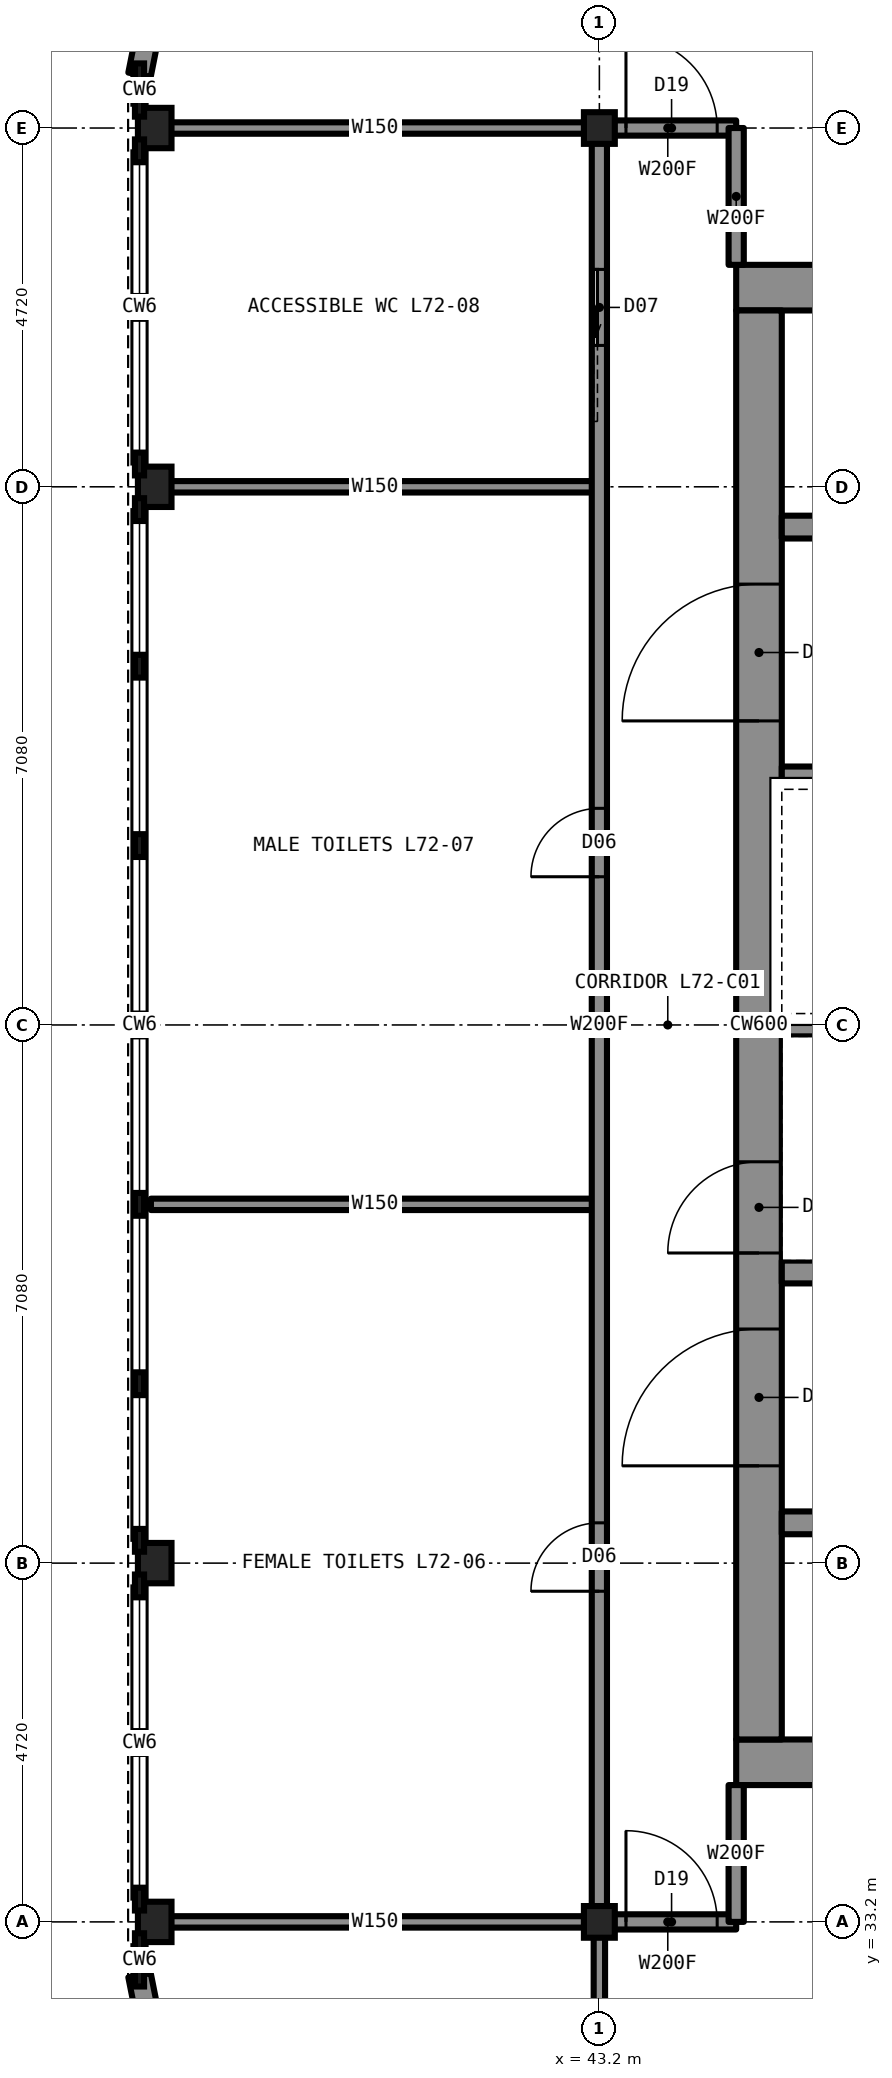
"""IFC4 building model, lengths in metres.
Left out: names, types, materials, properties, quantities, classifications, styles, units other than length and angle.
Written with IfcOpenShell. Run it as: python <this file> out.ifc"""

import sys

from ifc_helpers import new_model, si_unit, direction, frame, frame_2d, origin, origin_2d, place, context, subcontext, project, spatial, rectangle, i_section, extrude, element, fill, save


model = new_model("IFC4")
c1 = context("Model", 3, precision=1e-05, world=origin(), true_north=direction((0.0, 1.0)))
c2 = subcontext(c1, "Body", "Model", "MODEL_VIEW")
j1 = project(units=[si_unit("LENGTHUNIT", "METRE"), si_unit("PLANEANGLEUNIT", "RADIAN")], contexts=[c1])
p1 = place(None, origin())
s1 = spatial("IfcSite", under=j1, at=p1, CompositionType="ELEMENT")
p2 = place(p1, origin())
s2 = spatial("IfcBuilding", under=s1, at=p2, CompositionType="ELEMENT")
p3 = place(p2, frame((0.0, 0.0, 266.7)))
s3 = spatial("IfcBuildingStorey", under=s2, at=p3, CompositionType="ELEMENT", Elevation=266.7)
for number, where, z_axis, x_axis in (
    (1, (37.35, 33.2, 0.0), (0.0, 0.0, 1.0), (1.0, 0.0, 0.0)),
    (2, (37.35, 37.92, 0.0), (0.0, 0.0, 1.0), (1.0, 0.0, 0.0)),
    (3, (37.35, 52.08, 0.0), (0.0, 0.0, 1.0), (1.0, 0.0, 0.0)),
    (4, (37.35, 56.8, 0.0), (0.0, 0.0, 1.0), (1.0, 0.0, 0.0)),
):
    element("IfcColumn", number, at=place(p3, frame(where, z_axis=z_axis, x_axis=x_axis)), inside=s3, PredefinedType="COLUMN", context=c2, shape_type="SweptSolid", body=[
        extrude(i_section(OverallWidth=0.442, OverallDepth=0.531, WebThickness=0.066, FlangeThickness=0.106, at=origin_2d()), origin(), (0.0, 0.0, 1.0), 5.5),
    ])
for number, where, z_axis, x_axis in (
    (5, (43.2, 33.2, 0.0), (0.0, 0.0, 1.0), (1.0, 0.0, 0.0)),
    (6, (43.2, 56.8, 0.0), (0.0, 0.0, 1.0), (1.0, 0.0, 0.0)),
):
    element("IfcColumn", number, at=place(p3, frame(where, z_axis=z_axis, x_axis=x_axis)), inside=s3, PredefinedType="COLUMN", context=c2, shape_type="SweptSolid", body=[
        extrude(i_section(OverallWidth=0.406, OverallDepth=0.417, WebThickness=0.03, FlangeThickness=0.048, at=origin_2d()), origin(), (0.0, 0.0, 1.0), 5.5),
    ])
for number, where, z_axis, x_axis in (
    (7, (45.0, 54.7, 0.0), (0.0, 0.0, 1.0), (1.0, 0.0, 0.0)),
    (8, (45.0, 35.3, 0.0), (0.0, 0.0, 1.0), (1.0, 0.0, 0.0)),
):
    element("IfcWall", number, at=place(p3, frame(where, z_axis=z_axis, x_axis=x_axis)), inside=s3, PredefinedType="SHEAR", context=c2, shape_type="SweptSolid", body=[
        extrude(rectangle(XDim=20.0, YDim=0.6, at=frame_2d((10.0, 0.0))), origin(), (0.0, 0.0, 1.0), 5.5),
    ])
p4 = place(p3, frame((45.3, 35.6, 0.0), z_axis=(0.0, 0.0, 1.0), x_axis=(0.0, 1.0, 0.0)))
e9 = element("IfcWall", 9, at=p4, inside=s3, PredefinedType="SHEAR", context=c2, shape_type="SweptSolid", body=[
    extrude(rectangle(XDim=18.8, YDim=0.6, at=frame_2d((9.4, 0.0))), origin(), (0.0, 0.0, 1.0), 5.5),
])
p5 = place(p4, frame((13.4, 0.0, 0.0)))
e10 = element("IfcOpeningElement", 10, at=p5, cuts=e9, PredefinedType="OPENING", context=c2, shape_type="SweptSolid", body=[
    extrude(rectangle(XDim=1.8, YDim=2.2, at=frame_2d((0.9, 1.1))), frame((0.0, 0.31, 0.0), z_axis=(0.0, -1.0, 0.0), x_axis=(1.0, 0.0, 0.0)), (0.0, 0.0, 1.0), 0.62),
])
p6 = place(p4, frame((3.6, 0.0, 0.0)))
e11 = element("IfcOpeningElement", 11, at=p6, cuts=e9, PredefinedType="OPENING", context=c2, shape_type="SweptSolid", body=[
    extrude(rectangle(XDim=1.8, YDim=2.2, at=frame_2d((0.9, 1.1))), frame((0.0, 0.31, 0.0), z_axis=(0.0, -1.0, 0.0), x_axis=(1.0, 0.0, 0.0)), (0.0, 0.0, 1.0), 0.62),
])
p7 = place(p4, frame((6.4, 0.0, 0.0)))
e12 = element("IfcOpeningElement", 12, at=p7, cuts=e9, PredefinedType="OPENING", context=c2, shape_type="SweptSolid", body=[
    extrude(rectangle(XDim=1.2, YDim=2.2, at=frame_2d((0.6, 1.1))), frame((0.0, 0.31, 0.0), z_axis=(0.0, -1.0, 0.0), x_axis=(1.0, 0.0, 0.0)), (0.0, 0.0, 1.0), 0.62),
])
p8 = place(p3, frame((45.6, 51.55, 0.0), z_axis=(0.0, 0.0, 1.0), x_axis=(1.0, 0.0, 0.0)))
e13 = element("IfcWall", 13, at=p8, inside=s3, PredefinedType="SHEAR", context=c2, shape_type="SweptSolid", body=[
    extrude(rectangle(XDim=18.8, YDim=0.3, at=frame_2d((9.4, 0.0))), origin(), (0.0, 0.0, 1.0), 5.5),
])
p9 = place(p8, frame((4.8, 0.0, 0.0)))
e14 = element("IfcOpeningElement", 14, at=p9, cuts=e13, PredefinedType="OPENING", context=c2, shape_type="SweptSolid", body=[
    extrude(rectangle(XDim=1.0, YDim=2.1, at=frame_2d((0.5, 1.05))), frame((0.0, 0.16, 0.0), z_axis=(0.0, -1.0, 0.0), x_axis=(1.0, 0.0, 0.0)), (0.0, 0.0, 1.0), 0.32),
])
p10 = place(p8, frame((11.6, 0.0, 0.0)))
e15 = element("IfcOpeningElement", 15, at=p10, cuts=e13, PredefinedType="OPENING", context=c2, shape_type="SweptSolid", body=[
    extrude(rectangle(XDim=1.1, YDim=2.2, at=frame_2d((0.55, 1.1))), frame((0.0, 0.16, 0.0), z_axis=(0.0, -1.0, 0.0), x_axis=(1.0, 0.0, 0.0)), (0.0, 0.0, 1.0), 0.32),
])
p11 = place(p8, frame((14.3, 0.0, 0.0)))
e16 = element("IfcOpeningElement", 16, at=p11, cuts=e13, PredefinedType="OPENING", context=c2, shape_type="SweptSolid", body=[
    extrude(rectangle(XDim=1.1, YDim=2.2, at=frame_2d((0.55, 1.1))), frame((0.0, 0.16, 0.0), z_axis=(0.0, -1.0, 0.0), x_axis=(1.0, 0.0, 0.0)), (0.0, 0.0, 1.0), 0.32),
])
p12 = place(p3, frame((45.6, 38.45, 0.0), z_axis=(0.0, 0.0, 1.0), x_axis=(1.0, 0.0, 0.0)))
e17 = element("IfcWall", 17, at=p12, inside=s3, PredefinedType="SHEAR", context=c2, shape_type="SweptSolid", body=[
    extrude(rectangle(XDim=18.8, YDim=0.3, at=frame_2d((9.4, 0.0))), origin(), (0.0, 0.0, 1.0), 5.5),
])
p13 = place(p12, frame((4.8, 0.0, 0.0)))
e18 = element("IfcOpeningElement", 18, at=p13, cuts=e17, PredefinedType="OPENING", context=c2, shape_type="SweptSolid", body=[
    extrude(rectangle(XDim=1.0, YDim=2.1, at=frame_2d((0.5, 1.05))), frame((0.0, 0.16, 0.0), z_axis=(0.0, -1.0, 0.0), x_axis=(1.0, 0.0, 0.0)), (0.0, 0.0, 1.0), 0.32),
])
p14 = place(p12, frame((11.5, 0.0, 0.0)))
e19 = element("IfcOpeningElement", 19, at=p14, cuts=e17, PredefinedType="OPENING", context=c2, shape_type="SweptSolid", body=[
    extrude(rectangle(XDim=1.1, YDim=2.2, at=frame_2d((0.55, 1.1))), frame((0.0, 0.16, 0.0), z_axis=(0.0, -1.0, 0.0), x_axis=(1.0, 0.0, 0.0)), (0.0, 0.0, 1.0), 0.32),
])
p15 = place(p12, frame((14.2, 0.0, 0.0)))
e20 = element("IfcOpeningElement", 20, at=p15, cuts=e17, PredefinedType="OPENING", context=c2, shape_type="SweptSolid", body=[
    extrude(rectangle(XDim=1.1, YDim=2.2, at=frame_2d((0.55, 1.1))), frame((0.0, 0.16, 0.0), z_axis=(0.0, -1.0, 0.0), x_axis=(1.0, 0.0, 0.0)), (0.0, 0.0, 1.0), 0.32),
])
p16 = place(p12, frame((16.9, 0.0, 0.0)))
e21 = element("IfcOpeningElement", 21, at=p16, cuts=e17, PredefinedType="OPENING", context=c2, shape_type="SweptSolid", body=[
    extrude(rectangle(XDim=1.1, YDim=2.2, at=frame_2d((0.55, 1.1))), frame((0.0, 0.16, 0.0), z_axis=(0.0, -1.0, 0.0), x_axis=(1.0, 0.0, 0.0)), (0.0, 0.0, 1.0), 0.32),
])
for number, where, z_axis, x_axis in (
    (22, (45.6, 48.25, 0.0), (0.0, 0.0, 1.0), (1.0, 0.0, 0.0)),
    (23, (45.6, 41.75, 0.0), (0.0, 0.0, 1.0), (1.0, 0.0, 0.0)),
):
    element("IfcWall", number, at=place(p3, frame(where, z_axis=z_axis, x_axis=x_axis)), inside=s3, PredefinedType="SHEAR", context=c2, shape_type="SweptSolid", body=[
        extrude(rectangle(XDim=7.1, YDim=0.3, at=frame_2d((3.55, 0.0))), origin(), (0.0, 0.0, 1.0), 5.5),
    ])
p17 = place(p3, frame((45.6, 45.0, 0.0), z_axis=(0.0, 0.0, 1.0), x_axis=(1.0, 0.0, 0.0)))
e24 = element("IfcWall", 24, at=p17, inside=s3, PredefinedType="SHEAR", context=c2, shape_type="SweptSolid", body=[
    extrude(rectangle(XDim=6.8, YDim=0.3, at=frame_2d((3.4, 0.0))), origin(), (0.0, 0.0, 1.0), 5.5),
])
p18 = place(p3, frame((43.2, 33.2, 0.0), z_axis=(0.0, 0.0, 1.0), x_axis=(1.0, 0.0, 0.0)))
e25 = element("IfcWall", 25, at=p18, inside=s3, PredefinedType="PARTITIONING", context=c2, shape_type="SweptSolid", body=[
    extrude(rectangle(XDim=1.8, YDim=0.2, at=frame_2d((0.9, 0.0))), origin(), (0.0, 0.0, 1.0), 5.28),
])
p19 = place(p18, frame((0.35, 0.0, 0.0)))
e26 = element("IfcOpeningElement", 26, at=p19, cuts=e25, PredefinedType="OPENING", context=c2, shape_type="SweptSolid", body=[
    extrude(rectangle(XDim=1.2, YDim=2.2, at=frame_2d((0.6, 1.1))), frame((0.0, 0.11, 0.0), z_axis=(0.0, -1.0, 0.0), x_axis=(1.0, 0.0, 0.0)), (0.0, 0.0, 1.0), 0.22),
])
for number, where, z_axis, x_axis in (
    (27, (37.3, 33.2, 0.0), (0.0, 0.0, 1.0), (1.0, 0.0, 0.0)),
    (28, (37.3, 42.64, 0.0), (0.0, 0.0, 1.0), (1.0, 0.0, 0.0)),
):
    element("IfcWall", number, at=place(p3, frame(where, z_axis=z_axis, x_axis=x_axis)), inside=s3, PredefinedType="PARTITIONING", context=c2, shape_type="SweptSolid", body=[
        extrude(rectangle(XDim=5.9, YDim=0.15, at=frame_2d((2.95, 0.0))), origin(), (0.0, 0.0, 1.0), 4.368),
    ])
p20 = place(p3, frame((43.2, 56.8, 0.0), z_axis=(0.0, 0.0, 1.0), x_axis=(1.0, 0.0, 0.0)))
e29 = element("IfcWall", 29, at=p20, inside=s3, PredefinedType="PARTITIONING", context=c2, shape_type="SweptSolid", body=[
    extrude(rectangle(XDim=1.8, YDim=0.2, at=frame_2d((0.9, 0.0))), origin(), (0.0, 0.0, 1.0), 5.28),
])
p21 = place(p20, frame((0.35, 0.0, 0.0)))
e30 = element("IfcOpeningElement", 30, at=p21, cuts=e29, PredefinedType="OPENING", context=c2, shape_type="SweptSolid", body=[
    extrude(rectangle(XDim=1.2, YDim=2.2, at=frame_2d((0.6, 1.1))), frame((0.0, 0.11, 0.0), z_axis=(0.0, -1.0, 0.0), x_axis=(1.0, 0.0, 0.0)), (0.0, 0.0, 1.0), 0.22),
])
for number, where, z_axis, x_axis in (
    (31, (37.3, 56.8, 0.0), (0.0, 0.0, 1.0), (1.0, 0.0, 0.0)),
    (32, (37.3, 52.08, 0.0), (0.0, 0.0, 1.0), (1.0, 0.0, 0.0)),
):
    element("IfcWall", number, at=place(p3, frame(where, z_axis=z_axis, x_axis=x_axis)), inside=s3, PredefinedType="PARTITIONING", context=c2, shape_type="SweptSolid", body=[
        extrude(rectangle(XDim=5.9, YDim=0.15, at=frame_2d((2.95, 0.0))), origin(), (0.0, 0.0, 1.0), 4.368),
    ])
for number, where, z_axis, x_axis in (
    (33, (45.0, 33.2, 0.0), (0.0, 0.0, 1.0), (0.0, 1.0, 0.0)),
    (34, (45.0, 55.0, 0.0), (0.0, 0.0, 1.0), (0.0, 1.0, 0.0)),
):
    element("IfcWall", number, at=place(p3, frame(where, z_axis=z_axis, x_axis=x_axis)), inside=s3, PredefinedType="PARTITIONING", context=c2, shape_type="SweptSolid", body=[
        extrude(rectangle(XDim=1.8, YDim=0.2, at=frame_2d((0.9, 0.0))), origin(), (0.0, 0.0, 1.0), 5.28),
    ])
p22 = place(p3, frame((43.2, 33.2, 0.0), z_axis=(0.0, 0.0, 1.0), x_axis=(0.0, 1.0, 0.0)))
e35 = element("IfcWall", 35, at=p22, inside=s3, PredefinedType="PARTITIONING", context=c2, shape_type="SweptSolid", body=[
    extrude(rectangle(XDim=23.6, YDim=0.2, at=frame_2d((11.8, 0.0))), origin(), (0.0, 0.0, 1.0), 5.28),
])
p23 = place(p22, frame((20.74, 0.0, 0.0)))
e36 = element("IfcOpeningElement", 36, at=p23, cuts=e35, PredefinedType="OPENING", context=c2, shape_type="SweptSolid", body=[
    extrude(rectangle(XDim=1.0, YDim=2.1, at=frame_2d((0.5, 1.05))), frame((0.0, 0.11, 0.0), z_axis=(0.0, -1.0, 0.0), x_axis=(1.0, 0.0, 0.0)), (0.0, 0.0, 1.0), 0.22),
])
p24 = place(p22, frame((4.35, 0.0, 0.0)))
e37 = element("IfcOpeningElement", 37, at=p24, cuts=e35, PredefinedType="OPENING", context=c2, shape_type="SweptSolid", body=[
    extrude(rectangle(XDim=0.9, YDim=2.1, at=frame_2d((0.45, 1.05))), frame((0.0, 0.11, 0.0), z_axis=(0.0, -1.0, 0.0), x_axis=(1.0, 0.0, 0.0)), (0.0, 0.0, 1.0), 0.22),
])
p25 = place(p22, frame((13.75, 0.0, 0.0)))
e38 = element("IfcOpeningElement", 38, at=p25, cuts=e35, PredefinedType="OPENING", context=c2, shape_type="SweptSolid", body=[
    extrude(rectangle(XDim=0.9, YDim=2.1, at=frame_2d((0.45, 1.05))), frame((0.0, 0.11, 0.0), z_axis=(0.0, -1.0, 0.0), x_axis=(1.0, 0.0, 0.0)), (0.0, 0.0, 1.0), 0.22),
])
p26 = place(p3, frame((43.2, 27.3, 0.0), z_axis=(0.0, 0.0, 1.0), x_axis=(0.0, 1.0, 0.0)))
e39 = element("IfcWall", 39, at=p26, inside=s3, PredefinedType="PARTITIONING", context=c2, shape_type="SweptSolid", body=[
    extrude(rectangle(XDim=5.9, YDim=0.15, at=frame_2d((2.95, 0.0))), origin(), (0.0, 0.0, 1.0), 4.368),
])
p27 = place(p26, frame((2.1, 0.0, 0.0)))
e40 = element("IfcOpeningElement", 40, at=p27, cuts=e39, PredefinedType="OPENING", context=c2, shape_type="SweptSolid", body=[
    extrude(rectangle(XDim=1.2, YDim=2.2, at=frame_2d((0.6, 1.1))), frame((0.0, 0.085, 0.0), z_axis=(0.0, -1.0, 0.0), x_axis=(1.0, 0.0, 0.0)), (0.0, 0.0, 1.0), 0.17),
])
for number, where, z_axis, x_axis in (
    (41, (37.557, 59.547, 0.0), (0.0, 0.0, 1.0), (-0.195, -0.981, 0.0)),
    (42, (37.15, 32.5, 0.0), (0.0, 0.0, 1.0), (0.195, -0.981, 0.0)),
):
    element("IfcWall", number, at=place(p3, frame(where, z_axis=z_axis, x_axis=x_axis)), inside=s3, PredefinedType="SOLIDWALL", context=c2, shape_type="SweptSolid", body=[
        extrude(rectangle(XDim=2.087, YDim=0.3, at=frame_2d((1.044, 0.0))), origin(), (0.0, 0.0, 1.0), 5.28),
    ])
p28 = place(p21, origin())
e43 = element("IfcDoor", 43, at=p28, inside=s3, OperationType="SINGLE_SWING_LEFT", PredefinedType="DOOR", context=c2, shape_type="SweptSolid", body=[
    extrude(rectangle(XDim=1.2, YDim=2.2, at=frame_2d((0.6, 1.1))), frame((0.0, 0.025, 0.0), z_axis=(0.0, -1.0, 0.0), x_axis=(1.0, 0.0, 0.0)), (0.0, 0.0, 1.0), 0.05),
])
fill(e30, e43)
p29 = place(p19, origin())
e44 = element("IfcDoor", 44, at=p29, inside=s3, OperationType="SINGLE_SWING_LEFT", PredefinedType="DOOR", context=c2, shape_type="SweptSolid", body=[
    extrude(rectangle(XDim=1.2, YDim=2.2, at=frame_2d((0.6, 1.1))), frame((0.0, 0.025, 0.0), z_axis=(0.0, -1.0, 0.0), x_axis=(1.0, 0.0, 0.0)), (0.0, 0.0, 1.0), 0.05),
])
fill(e26, e44)
p30 = place(p23, origin())
e45 = element("IfcDoor", 45, at=p30, inside=s3, OperationType="SLIDING_TO_LEFT", PredefinedType="DOOR", context=c2, shape_type="SweptSolid", body=[
    extrude(rectangle(XDim=1.0, YDim=2.1, at=frame_2d((0.5, 1.05))), frame((0.0, 0.025, 0.0), z_axis=(0.0, -1.0, 0.0), x_axis=(1.0, 0.0, 0.0)), (0.0, 0.0, 1.0), 0.05),
])
fill(e36, e45)
p31 = place(p24, origin())
e46 = element("IfcDoor", 46, at=p31, inside=s3, OperationType="SINGLE_SWING_LEFT", PredefinedType="DOOR", context=c2, shape_type="SweptSolid", body=[
    extrude(rectangle(XDim=0.9, YDim=2.1, at=frame_2d((0.45, 1.05))), frame((0.0, 0.025, 0.0), z_axis=(0.0, -1.0, 0.0), x_axis=(1.0, 0.0, 0.0)), (0.0, 0.0, 1.0), 0.05),
])
fill(e37, e46)
p32 = place(p25, origin())
e47 = element("IfcDoor", 47, at=p32, inside=s3, OperationType="SINGLE_SWING_LEFT", PredefinedType="DOOR", context=c2, shape_type="SweptSolid", body=[
    extrude(rectangle(XDim=0.9, YDim=2.1, at=frame_2d((0.45, 1.05))), frame((0.0, 0.025, 0.0), z_axis=(0.0, -1.0, 0.0), x_axis=(1.0, 0.0, 0.0)), (0.0, 0.0, 1.0), 0.05),
])
fill(e38, e47)
p33 = place(p5, origin())
e48 = element("IfcDoor", 48, at=p33, inside=s3, OperationType="DOUBLE_DOOR_SINGLE_SWING", PredefinedType="DOOR", context=c2, shape_type="SweptSolid", body=[
    extrude(rectangle(XDim=1.8, YDim=2.2, at=frame_2d((0.9, 1.1))), frame((0.0, 0.025, 0.0), z_axis=(0.0, -1.0, 0.0), x_axis=(1.0, 0.0, 0.0)), (0.0, 0.0, 1.0), 0.05),
])
fill(e10, e48)
p34 = place(p6, origin())
e49 = element("IfcDoor", 49, at=p34, inside=s3, OperationType="DOUBLE_DOOR_SINGLE_SWING", PredefinedType="DOOR", context=c2, shape_type="SweptSolid", body=[
    extrude(rectangle(XDim=1.8, YDim=2.2, at=frame_2d((0.9, 1.1))), frame((0.0, 0.025, 0.0), z_axis=(0.0, -1.0, 0.0), x_axis=(1.0, 0.0, 0.0)), (0.0, 0.0, 1.0), 0.05),
])
fill(e11, e49)
p35 = place(p7, origin())
e50 = element("IfcDoor", 50, at=p35, inside=s3, OperationType="SINGLE_SWING_LEFT", PredefinedType="DOOR", context=c2, shape_type="SweptSolid", body=[
    extrude(rectangle(XDim=1.2, YDim=2.2, at=frame_2d((0.6, 1.1))), frame((0.0, 0.025, 0.0), z_axis=(0.0, -1.0, 0.0), x_axis=(1.0, 0.0, 0.0)), (0.0, 0.0, 1.0), 0.05),
])
fill(e12, e50)
save(model, sys.argv[1])
